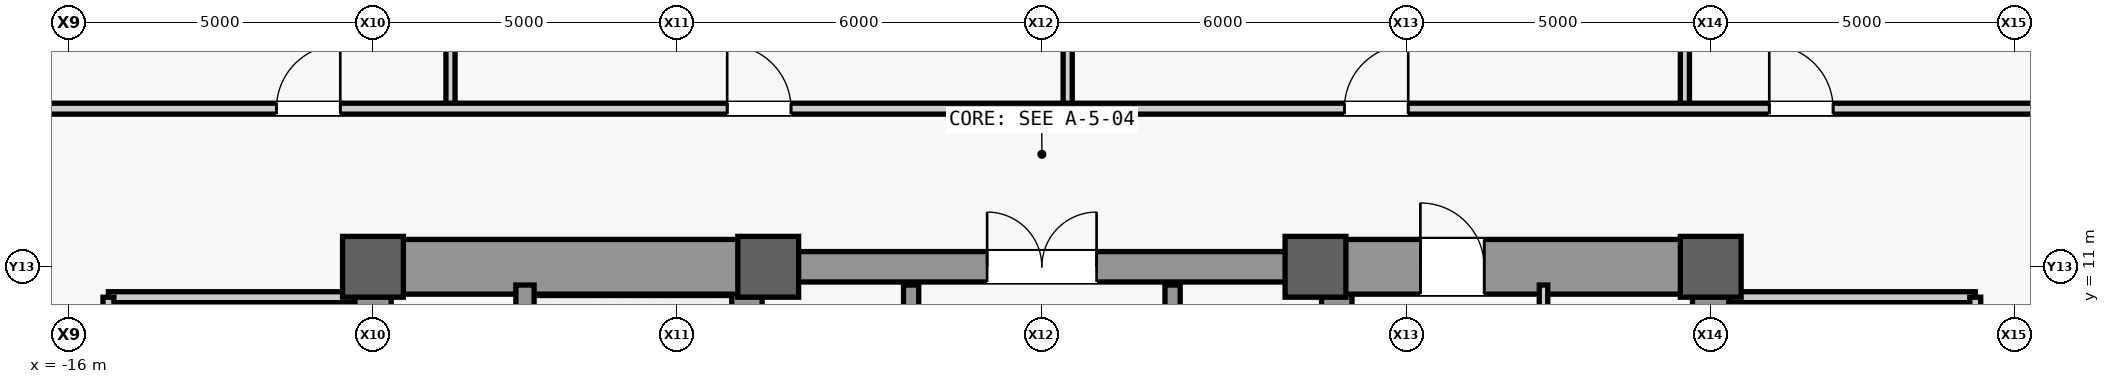
"""IFC4 building model, lengths in metres.
Left out: names, types, materials, properties, quantities, classifications, styles, units other than length and angle.
Written with IfcOpenShell. Run it as: python <this file> out.ifc"""

import sys

from ifc_helpers import new_model, si_unit, direction, frame, frame_2d, origin, origin_2d, place, context, subcontext, project, spatial, rectangle, extrude, source, transform, mapped, element, fill, save


model = new_model("IFC4")
c1 = context("Model", 3, precision=1e-05, world=origin(), true_north=direction((0.0, 1.0)))
c2 = subcontext(c1, "Body", "Model", "MODEL_VIEW")
j1 = project(units=[si_unit("LENGTHUNIT", "METRE"), si_unit("PLANEANGLEUNIT", "RADIAN")], contexts=[c1])
p1 = place(None, origin())
s1 = spatial("IfcSite", under=j1, at=p1, CompositionType="ELEMENT")
p2 = place(p1, origin())
s2 = spatial("IfcBuilding", under=s1, at=p2, CompositionType="ELEMENT")
p3 = place(p2, frame((0.0, 0.0, 32.6)))
s3 = spatial("IfcBuildingStorey", under=s2, at=p3, CompositionType="ELEMENT", Elevation=32.6)
m1 = source(origin(), c2, "Body", "SweptSolid", [
    extrude(rectangle(XDim=22.0, YDim=0.6, at=frame_2d((11.0, 0.0))), origin(), (0.0, 0.0, 1.0), 3.94),
])
p4 = place(p3, frame((-11.0, -11.0, 0.0), z_axis=(0.0, 0.0, 1.0), x_axis=(0.0, 1.0, 0.0)))
e1 = element("IfcWall", 1, at=p4, inside=s3, PredefinedType="SHEAR", context=c2, shape_type="MappedRepresentation", body=[
    mapped(m1, transform((0.0, 0.0, 0.0), scale=1.0)),
])
m2 = source(origin(), c2, "Body", "SweptSolid", [
    extrude(rectangle(XDim=1.1, YDim=2.2, at=frame_2d((0.55, 1.1))), frame((0.0, 0.31, 0.0), z_axis=(0.0, -1.0, 0.0), x_axis=(1.0, 0.0, 0.0)), (0.0, 0.0, 1.0), 0.62),
])
p5 = place(p4, frame((0.8, 0.0, 0.0)))
e2 = element("IfcOpeningElement", 2, at=p5, cuts=e1, PredefinedType="OPENING", context=c2, shape_type="MappedRepresentation", body=[
    mapped(m2, transform((0.0, 0.0, 0.0), scale=1.0)),
])
p6 = place(p4, frame((12.5, 0.0, 0.0)))
e3 = element("IfcOpeningElement", 3, at=p6, cuts=e1, PredefinedType="OPENING", context=c2, shape_type="MappedRepresentation", body=[
    mapped(m2, transform((0.0, 0.0, 0.0), scale=1.0)),
])
m3 = source(origin(), c2, "Body", "SweptSolid", [
    extrude(rectangle(XDim=0.9, YDim=2.15, at=frame_2d((0.45, 1.075))), frame((0.0, 0.31, 0.0), z_axis=(0.0, -1.0, 0.0), x_axis=(1.0, 0.0, 0.0)), (0.0, 0.0, 1.0), 0.62),
])
p7 = place(p4, frame((6.85, 0.0, 0.0)))
e4 = element("IfcOpeningElement", 4, at=p7, cuts=e1, PredefinedType="OPENING", context=c2, shape_type="MappedRepresentation", body=[
    mapped(m3, transform((0.0, 0.0, 0.0), scale=1.0)),
])
m4 = source(origin(), c2, "Body", "SweptSolid", [
    extrude(rectangle(XDim=1.3, YDim=2.3, at=frame_2d((0.65, 1.15))), frame((0.0, 0.31, 0.0), z_axis=(0.0, -1.0, 0.0), x_axis=(1.0, 0.0, 0.0)), (0.0, 0.0, 1.0), 0.62),
])
p8 = place(p4, frame((2.7, 0.0, 0.0)))
e5 = element("IfcOpeningElement", 5, at=p8, cuts=e1, PredefinedType="OPENING", context=c2, shape_type="MappedRepresentation", body=[
    mapped(m4, transform((0.0, 0.0, 0.0), scale=1.0)),
])
p9 = place(p3, frame((11.0, -11.0, 0.0), z_axis=(0.0, 0.0, 1.0), x_axis=(0.0, 1.0, 0.0)))
e6 = element("IfcWall", 6, at=p9, inside=s3, PredefinedType="SHEAR", context=c2, shape_type="MappedRepresentation", body=[
    mapped(m1, transform((0.0, 0.0, 0.0), scale=1.0)),
])
p10 = place(p9, frame((0.8, 0.0, 0.0)))
e7 = element("IfcOpeningElement", 7, at=p10, cuts=e6, PredefinedType="OPENING", context=c2, shape_type="MappedRepresentation", body=[
    mapped(m2, transform((0.0, 0.0, 0.0), scale=1.0)),
])
p11 = place(p9, frame((6.2, 0.0, 0.0)))
e8 = element("IfcOpeningElement", 8, at=p11, cuts=e6, PredefinedType="OPENING", context=c2, shape_type="MappedRepresentation", body=[
    mapped(m3, transform((0.0, 0.0, 0.0), scale=1.0)),
])
p12 = place(p9, frame((8.05, 0.0, 0.0)))
e9 = element("IfcOpeningElement", 9, at=p12, cuts=e6, PredefinedType="OPENING", context=c2, shape_type="MappedRepresentation", body=[
    mapped(m3, transform((0.0, 0.0, 0.0), scale=1.0)),
])
p13 = place(p9, frame((2.7, 0.0, 0.0)))
e10 = element("IfcOpeningElement", 10, at=p13, cuts=e6, PredefinedType="OPENING", context=c2, shape_type="MappedRepresentation", body=[
    mapped(m4, transform((0.0, 0.0, 0.0), scale=1.0)),
])
p14 = place(p9, frame((13.35, 0.0, 0.0)))
e11 = element("IfcOpeningElement", 11, at=p14, cuts=e6, PredefinedType="OPENING", context=c2, shape_type="MappedRepresentation", body=[
    mapped(m4, transform((0.0, 0.0, 0.0), scale=1.0)),
])
m5 = source(origin(), c2, "Body", "SweptSolid", [
    extrude(rectangle(XDim=21.4, YDim=0.5, at=frame_2d((10.7, 0.0))), origin(), (0.0, 0.0, 1.0), 3.94),
])
for number, where, z_axis, x_axis in (
    (12, (-4.85, -10.7, 0.0), (0.0, 0.0, 1.0), (0.0, 1.0, 0.0)),
    (13, (4.85, -10.7, 0.0), (0.0, 0.0, 1.0), (0.0, 1.0, 0.0)),
):
    element("IfcWall", number, at=place(p3, frame(where, z_axis=z_axis, x_axis=x_axis)), inside=s3, PredefinedType="SHEAR", context=c2, shape_type="MappedRepresentation", body=[
        mapped(m5, transform((0.0, 0.0, 0.0), scale=1.0)),
    ])
m6 = source(origin(), c2, "Body", "SweptSolid", [
    extrude(rectangle(XDim=5.85, YDim=0.9, at=frame_2d((2.925, 0.0))), origin(), (0.0, 0.0, 1.0), 3.94),
])
p15 = place(p3, frame((-10.7, 11.0, 0.0), z_axis=(0.0, 0.0, 1.0), x_axis=(1.0, 0.0, 0.0)))
e14 = element("IfcWall", 14, at=p15, inside=s3, PredefinedType="SHEAR", context=c2, shape_type="MappedRepresentation", body=[
    mapped(m6, transform((0.0, 0.0, 0.0), scale=1.0)),
])
p16 = place(p3, frame((4.85, 11.0, 0.0), z_axis=(0.0, 0.0, 1.0), x_axis=(1.0, 0.0, 0.0)))
e15 = element("IfcWall", 15, at=p16, inside=s3, PredefinedType="SHEAR", context=c2, shape_type="MappedRepresentation", body=[
    mapped(m6, transform((0.0, 0.0, 0.0), scale=1.0)),
])
m7 = source(origin(), c2, "Body", "SweptSolid", [
    extrude(rectangle(XDim=1.05, YDim=2.2, at=frame_2d((0.525, 1.1))), frame((0.0, 0.46, 0.0), z_axis=(0.0, -1.0, 0.0), x_axis=(1.0, 0.0, 0.0)), (0.0, 0.0, 1.0), 0.92),
])
p17 = place(p16, frame((1.375, 0.0, 0.0)))
e16 = element("IfcOpeningElement", 16, at=p17, cuts=e15, PredefinedType="OPENING", context=c2, shape_type="MappedRepresentation", body=[
    mapped(m7, transform((0.0, 0.0, 0.0), scale=1.0)),
])
m8 = source(origin(), c2, "Body", "SweptSolid", [
    extrude(rectangle(XDim=9.2, YDim=0.5, at=frame_2d((4.6, 0.0))), origin(), (0.0, 0.0, 1.0), 3.94),
])
p18 = place(p3, frame((-4.6, 11.0, 0.0), z_axis=(0.0, 0.0, 1.0), x_axis=(1.0, 0.0, 0.0)))
e17 = element("IfcWall", 17, at=p18, inside=s3, PredefinedType="SHEAR", context=c2, shape_type="MappedRepresentation", body=[
    mapped(m8, transform((0.0, 0.0, 0.0), scale=1.0)),
])
m9 = source(origin(), c2, "Body", "SweptSolid", [
    extrude(rectangle(XDim=1.8, YDim=2.25, at=frame_2d((0.9, 1.125))), frame((0.0, 0.26, 0.0), z_axis=(0.0, -1.0, 0.0), x_axis=(1.0, 0.0, 0.0)), (0.0, 0.0, 1.0), 0.52),
])
p19 = place(p18, frame((3.7, 0.0, 0.0)))
e18 = element("IfcOpeningElement", 18, at=p19, cuts=e17, PredefinedType="OPENING", context=c2, shape_type="MappedRepresentation", body=[
    mapped(m9, transform((0.0, 0.0, 0.0), scale=1.0)),
])
m10 = source(origin(), c2, "Body", "SweptSolid", [
    extrude(rectangle(XDim=1.0, YDim=1.0, at=origin_2d()), origin(), (0.0, 0.0, 1.0), 4.2),
])
for number, where, z_axis, x_axis in (
    (19, (-11.0, 11.0, 0.0), (0.0, 0.0, 1.0), (1.0, 0.0, 0.0)),
    (20, (-4.5, 11.0, 0.0), (0.0, 0.0, 1.0), (1.0, 0.0, 0.0)),
    (21, (4.5, 11.0, 0.0), (0.0, 0.0, 1.0), (1.0, 0.0, 0.0)),
    (22, (11.0, 11.0, 0.0), (0.0, 0.0, 1.0), (1.0, 0.0, 0.0)),
):
    element("IfcColumn", number, at=place(p3, frame(where, z_axis=z_axis, x_axis=x_axis)), inside=s3, PredefinedType="COLUMN", context=c2, shape_type="MappedRepresentation", body=[
        mapped(m10, transform((0.0, 0.0, 0.0), scale=1.0)),
    ])
m11 = source(origin(), c2, "Body", "SweptSolid", [
    extrude(rectangle(XDim=7.75, YDim=0.3, at=frame_2d((3.875, 0.0))), origin(), (0.0, 0.0, 1.0), 3.94),
])
p20 = place(p3, frame((-8.5, 2.95, 0.0), z_axis=(0.0, 0.0, 1.0), x_axis=(0.0, 1.0, 0.0)))
e23 = element("IfcWall", 23, at=p20, inside=s3, PredefinedType="SHEAR", context=c2, shape_type="MappedRepresentation", body=[
    mapped(m11, transform((0.0, 0.0, 0.0), scale=1.0)),
])
m12 = source(origin(), c2, "Body", "SweptSolid", [
    extrude(rectangle(XDim=9.4, YDim=0.14, at=frame_2d((4.7, 0.0))), origin(), (0.0, 0.0, 1.0), 3.94),
])
p21 = place(p3, frame((8.25, 1.3, 0.0), z_axis=(0.0, 0.0, 1.0), x_axis=(0.0, 1.0, 0.0)))
e24 = element("IfcWall", 24, at=p21, inside=s3, PredefinedType="PARTITIONING", context=c2, shape_type="MappedRepresentation", body=[
    mapped(m12, transform((0.0, 0.0, 0.0), scale=1.0)),
])
m13 = source(origin(), c2, "Body", "SweptSolid", [
    extrude(rectangle(XDim=4.05, YDim=0.18, at=frame_2d((2.025, 0.0))), origin(), (0.0, 0.0, 1.0), 3.94),
])
p22 = place(p3, frame((-15.35, 10.5, 0.0), z_axis=(0.0, 0.0, 1.0), x_axis=(1.0, 0.0, 0.0)))
e25 = element("IfcWall", 25, at=p22, inside=s3, PredefinedType="PARTITIONING", context=c2, shape_type="MappedRepresentation", body=[
    mapped(m13, transform((0.0, 0.0, 0.0), scale=1.0)),
])
m14 = source(origin(), c2, "Body", "SweptSolid", [
    extrude(rectangle(XDim=16.6, YDim=0.18, at=frame_2d((8.3, 0.0))), origin(), (0.0, 0.0, 1.0), 3.94),
])
p23 = place(p3, frame((-15.35, -6.1, 0.0), z_axis=(0.0, 0.0, 1.0), x_axis=(0.0, 1.0, 0.0)))
e26 = element("IfcWall", 26, at=p23, inside=s3, PredefinedType="PARTITIONING", context=c2, shape_type="MappedRepresentation", body=[
    mapped(m14, transform((0.0, 0.0, 0.0), scale=1.0)),
])
m15 = source(origin(), c2, "Body", "SweptSolid", [
    extrude(rectangle(XDim=1.8, YDim=2.25, at=frame_2d((0.9, 1.125))), frame((0.0, 0.1, 0.0), z_axis=(0.0, -1.0, 0.0), x_axis=(1.0, 0.0, 0.0)), (0.0, 0.0, 1.0), 0.2),
])
p24 = place(p23, frame((2.7, 0.0, 0.0)))
e27 = element("IfcOpeningElement", 27, at=p24, cuts=e26, PredefinedType="OPENING", context=c2, shape_type="MappedRepresentation", body=[
    mapped(m15, transform((0.0, 0.0, 0.0), scale=1.0)),
])
p25 = place(p23, frame((11.0, 0.0, 0.0)))
e28 = element("IfcOpeningElement", 28, at=p25, cuts=e26, PredefinedType="OPENING", context=c2, shape_type="MappedRepresentation", body=[
    mapped(m15, transform((0.0, 0.0, 0.0), scale=1.0)),
])
p26 = place(p3, frame((11.3, 10.5, 0.0), z_axis=(0.0, 0.0, 1.0), x_axis=(1.0, 0.0, 0.0)))
e29 = element("IfcWall", 29, at=p26, inside=s3, PredefinedType="PARTITIONING", context=c2, shape_type="MappedRepresentation", body=[
    mapped(m13, transform((0.0, 0.0, 0.0), scale=1.0)),
])
p27 = place(p3, frame((15.35, -6.1, 0.0), z_axis=(0.0, 0.0, 1.0), x_axis=(0.0, 1.0, 0.0)))
e30 = element("IfcWall", 30, at=p27, inside=s3, PredefinedType="PARTITIONING", context=c2, shape_type="MappedRepresentation", body=[
    mapped(m14, transform((0.0, 0.0, 0.0), scale=1.0)),
])
p28 = place(p27, frame((2.7, 0.0, 0.0)))
e31 = element("IfcOpeningElement", 31, at=p28, cuts=e30, PredefinedType="OPENING", context=c2, shape_type="MappedRepresentation", body=[
    mapped(m15, transform((0.0, 0.0, 0.0), scale=1.0)),
])
p29 = place(p27, frame((13.0, 0.0, 0.0)))
e32 = element("IfcOpeningElement", 32, at=p29, cuts=e30, PredefinedType="OPENING", context=c2, shape_type="MappedRepresentation", body=[
    mapped(m15, transform((0.0, 0.0, 0.0), scale=1.0)),
])
m16 = source(origin(), c2, "Body", "SweptSolid", [
    extrude(rectangle(XDim=5.4, YDim=0.25, at=frame_2d((2.7, 0.0))), origin(), (0.0, 0.0, 1.0), 3.94),
])
for number, where, z_axis, x_axis in (
    (33, (-2.15, 5.3, 0.0), (0.0, 0.0, 1.0), (0.0, 1.0, 0.0)),
    (34, (2.15, 5.3, 0.0), (0.0, 0.0, 1.0), (0.0, 1.0, 0.0)),
):
    element("IfcWall", number, at=place(p3, frame(where, z_axis=z_axis, x_axis=x_axis)), inside=s3, PredefinedType="SHEAR", context=c2, shape_type="MappedRepresentation", body=[
        mapped(m16, transform((0.0, 0.0, 0.0), scale=1.0)),
    ])
m17 = source(origin(), c2, "Body", "SweptSolid", [
    extrude(rectangle(XDim=18.4, YDim=0.15, at=frame_2d((9.2, 0.0))), origin(), (0.0, 0.0, 1.0), 3.94),
])
for number, where, z_axis, x_axis in (
    (35, (-9.725, 13.6, 0.0), (0.0, 0.0, 1.0), (0.0, 1.0, 0.0)),
    (36, (0.425, 13.6, 0.0), (0.0, 0.0, 1.0), (0.0, 1.0, 0.0)),
    (37, (10.575, 13.6, 0.0), (0.0, 0.0, 1.0), (0.0, 1.0, 0.0)),
):
    element("IfcWall", number, at=place(p3, frame(where, z_axis=z_axis, x_axis=x_axis)), inside=s3, PredefinedType="PARTITIONING", context=c2, shape_type="MappedRepresentation", body=[
        mapped(m17, transform((0.0, 0.0, 0.0), scale=1.0)),
    ])
m18 = source(origin(), c2, "Body", "SweptSolid", [
    extrude(rectangle(XDim=36.25, YDim=0.18, at=frame_2d((18.125, 0.0))), origin(), (0.0, 0.0, 1.0), 3.94),
])
p30 = place(p3, frame((-17.7, 13.6, 0.0), z_axis=(0.0, 0.0, 1.0), x_axis=(1.0, 0.0, 0.0)))
e38 = element("IfcWall", 38, at=p30, inside=s3, PredefinedType="PARTITIONING", context=c2, shape_type="MappedRepresentation", body=[
    mapped(m18, transform((0.0, 0.0, 0.0), scale=1.0)),
])
m19 = source(origin(), c2, "Body", "SweptSolid", [
    extrude(rectangle(XDim=1.05, YDim=2.2, at=frame_2d((0.525, 1.1))), frame((0.0, 0.1, 0.0), z_axis=(0.0, -1.0, 0.0), x_axis=(1.0, 0.0, 0.0)), (0.0, 0.0, 1.0), 0.2),
])
p31 = place(p30, frame((5.113, 0.0, 0.0)))
e39 = element("IfcOpeningElement", 39, at=p31, cuts=e38, PredefinedType="OPENING", context=c2, shape_type="MappedRepresentation", body=[
    mapped(m19, transform((0.0, 0.0, 0.0), scale=1.0)),
])
p32 = place(p30, frame((12.525, 0.0, 0.0)))
e40 = element("IfcOpeningElement", 40, at=p32, cuts=e38, PredefinedType="OPENING", context=c2, shape_type="MappedRepresentation", body=[
    mapped(m19, transform((0.0, 0.0, 0.0), scale=1.0)),
])
p33 = place(p30, frame((22.675, 0.0, 0.0)))
e41 = element("IfcOpeningElement", 41, at=p33, cuts=e38, PredefinedType="OPENING", context=c2, shape_type="MappedRepresentation", body=[
    mapped(m19, transform((0.0, 0.0, 0.0), scale=1.0)),
])
p34 = place(p30, frame((29.663, 0.0, 0.0)))
e42 = element("IfcOpeningElement", 42, at=p34, cuts=e38, PredefinedType="OPENING", context=c2, shape_type="MappedRepresentation", body=[
    mapped(m19, transform((0.0, 0.0, 0.0), scale=1.0)),
])
m20 = source(origin(), c2, "Body", "SweptSolid", [
    extrude(rectangle(XDim=1.05, YDim=2.2, at=frame_2d((0.525, 1.1))), frame((0.0, 0.025, 0.0), z_axis=(0.0, -1.0, 0.0), x_axis=(1.0, 0.0, 0.0)), (0.0, 0.0, 1.0), 0.05),
])
p35 = place(p17, origin())
e43 = element("IfcDoor", 43, at=p35, inside=s3, OperationType="SINGLE_SWING_LEFT", PredefinedType="DOOR", context=c2, shape_type="MappedRepresentation", body=[
    mapped(m20, transform((0.0, 0.0, 0.0), scale=1.0)),
])
fill(e16, e43)
m21 = source(origin(), c2, "Body", "SweptSolid", [
    extrude(rectangle(XDim=1.8, YDim=2.25, at=frame_2d((0.9, 1.125))), frame((0.0, 0.025, 0.0), z_axis=(0.0, -1.0, 0.0), x_axis=(1.0, 0.0, 0.0)), (0.0, 0.0, 1.0), 0.05),
])
p36 = place(p19, origin())
e44 = element("IfcDoor", 44, at=p36, inside=s3, OperationType="SINGLE_SWING_RIGHT", PredefinedType="DOOR", context=c2, shape_type="MappedRepresentation", body=[
    mapped(m21, transform((0.0, 0.0, 0.0), scale=1.0)),
])
fill(e18, e44)
p37 = place(p31, origin())
e45 = element("IfcDoor", 45, at=p37, inside=s3, OperationType="SINGLE_SWING_RIGHT", PredefinedType="DOOR", context=c2, shape_type="MappedRepresentation", body=[
    mapped(m20, transform((0.0, 0.0, 0.0), scale=1.0)),
])
fill(e39, e45)
p38 = place(p32, origin())
e46 = element("IfcDoor", 46, at=p38, inside=s3, OperationType="SINGLE_SWING_LEFT", PredefinedType="DOOR", context=c2, shape_type="MappedRepresentation", body=[
    mapped(m20, transform((0.0, 0.0, 0.0), scale=1.0)),
])
fill(e40, e46)
p39 = place(p33, origin())
e47 = element("IfcDoor", 47, at=p39, inside=s3, OperationType="SINGLE_SWING_RIGHT", PredefinedType="DOOR", context=c2, shape_type="MappedRepresentation", body=[
    mapped(m20, transform((0.0, 0.0, 0.0), scale=1.0)),
])
fill(e41, e47)
p40 = place(p34, origin())
e48 = element("IfcDoor", 48, at=p40, inside=s3, OperationType="SINGLE_SWING_LEFT", PredefinedType="DOOR", context=c2, shape_type="MappedRepresentation", body=[
    mapped(m20, transform((0.0, 0.0, 0.0), scale=1.0)),
])
fill(e42, e48)
save(model, sys.argv[1])
